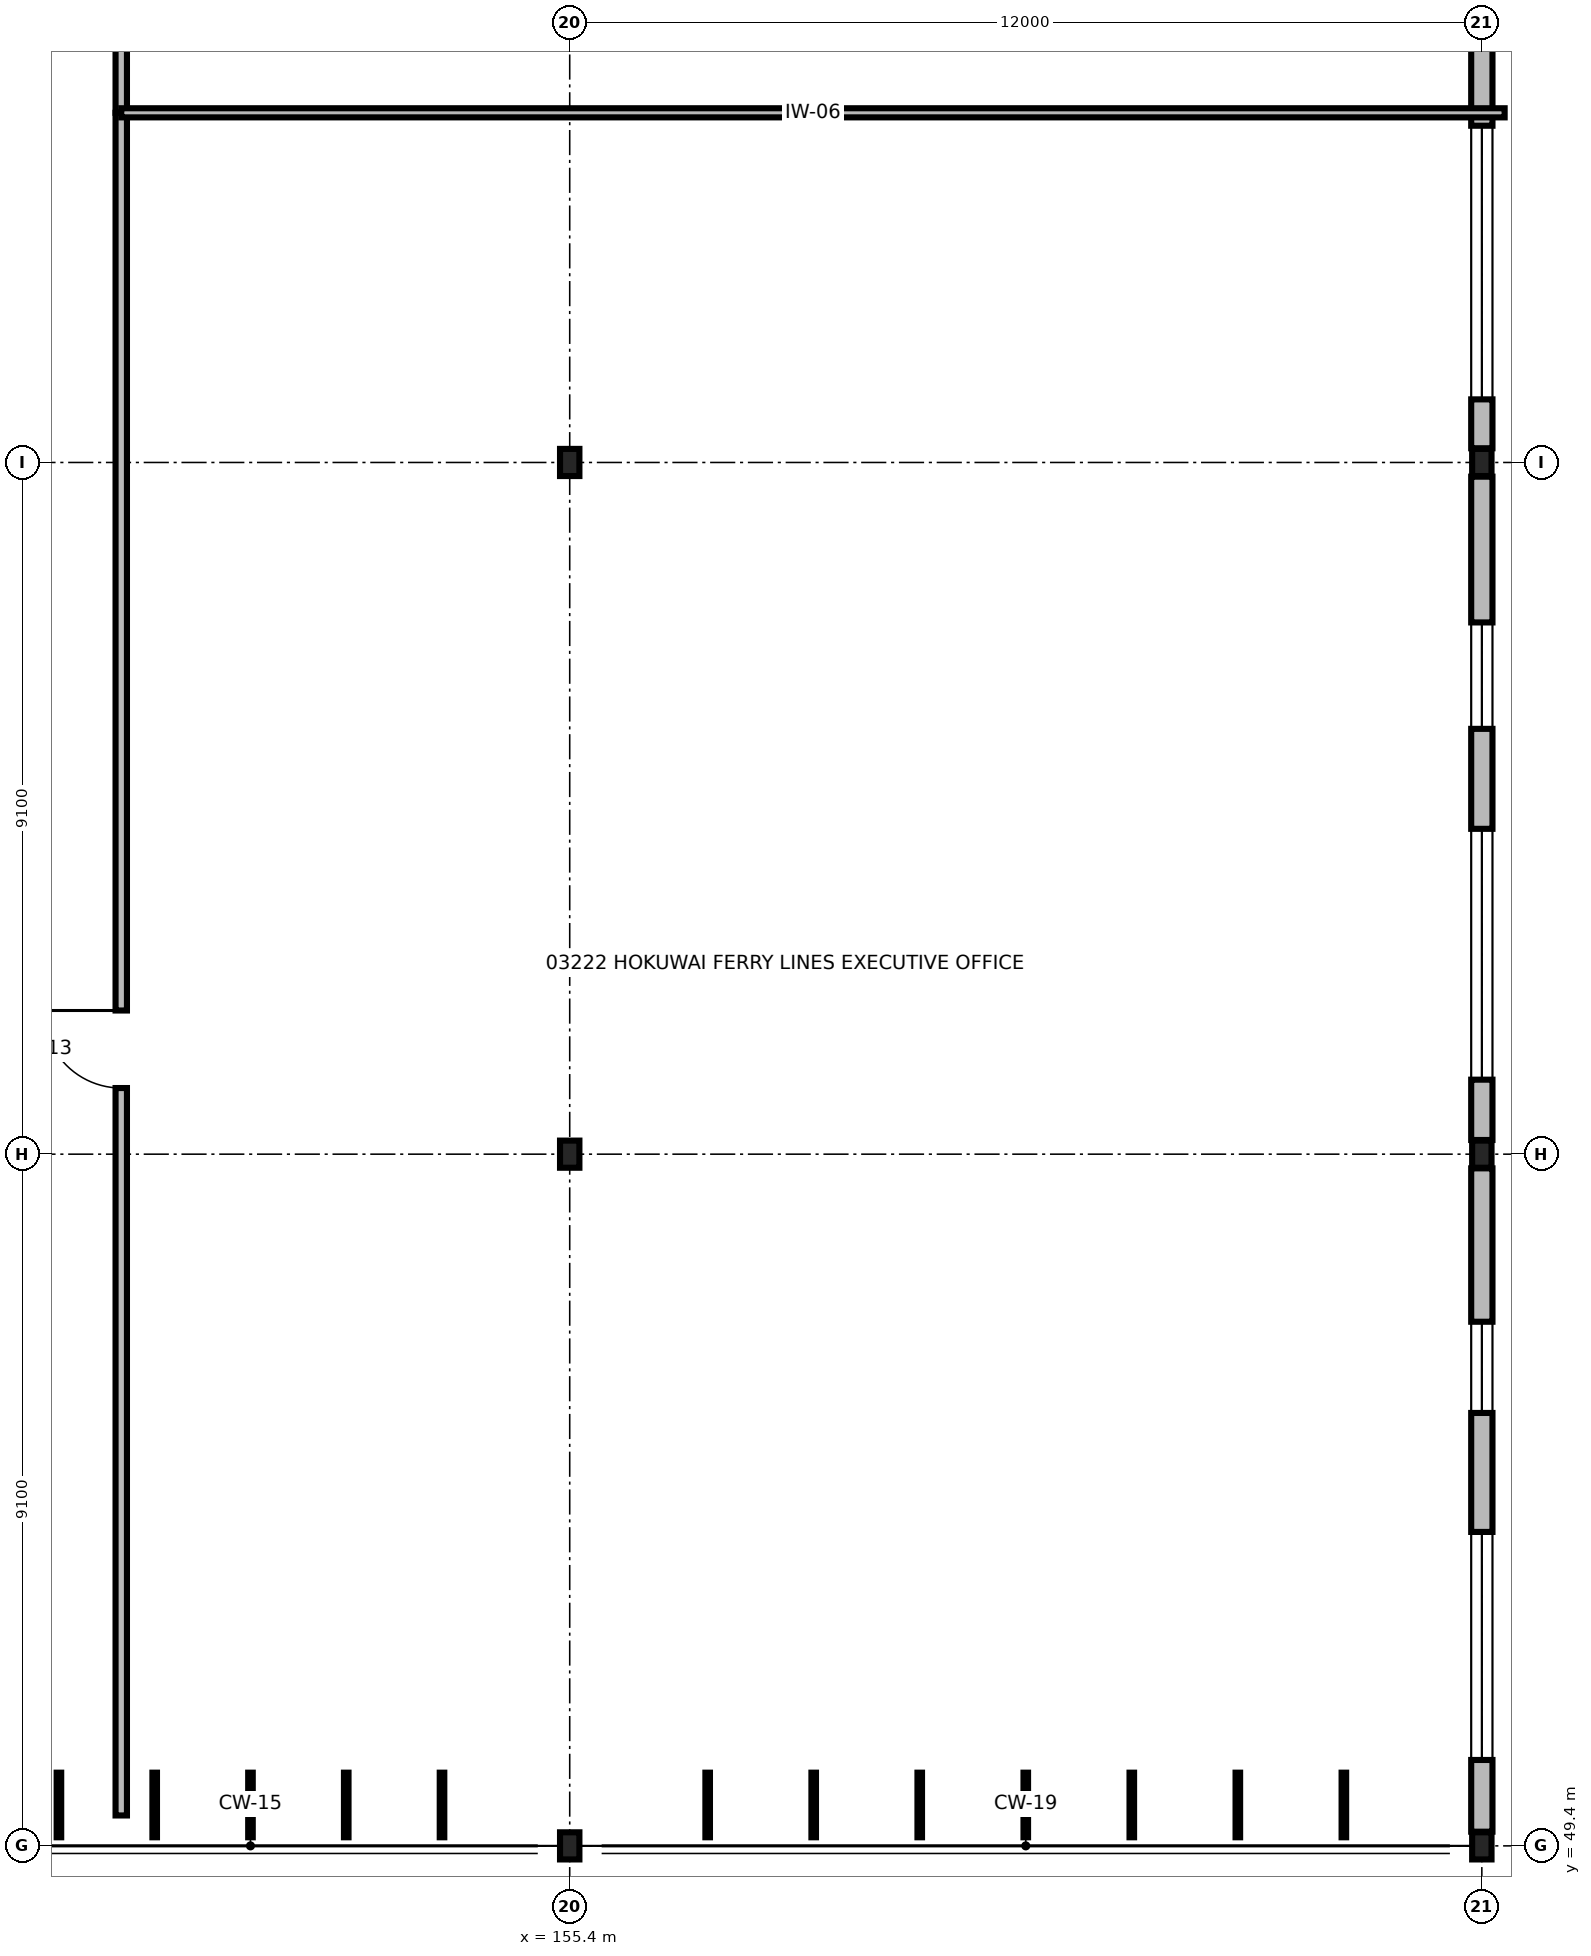
"""IFC4 building model, lengths in metres.
Left out: names, types, materials, properties, quantities, classifications, styles, units other than length and angle.
Written with IfcOpenShell. Run it as: python <this file> out.ifc"""

import sys

from ifc_helpers import new_model, si_unit, direction, frame, frame_2d, origin, origin_2d, place, context, subcontext, project, spatial, rectangle, i_section, extrude, element, fill, save


model = new_model("IFC4")
c1 = context("Model", 3, precision=1e-05, world=origin(), true_north=direction((0.0, 1.0)))
c2 = subcontext(c1, "Body", "Model", "MODEL_VIEW")
j1 = project(units=[si_unit("LENGTHUNIT", "METRE"), si_unit("PLANEANGLEUNIT", "RADIAN")], contexts=[c1])
p1 = place(None, origin())
s1 = spatial("IfcSite", under=j1, at=p1, CompositionType="ELEMENT")
p2 = place(p1, origin())
s2 = spatial("IfcBuilding", under=s1, at=p2, CompositionType="ELEMENT")
p3 = place(p2, frame((0.0, 0.0, 13.8)))
s3 = spatial("IfcBuildingStorey", under=s2, at=p3, CompositionType="ELEMENT", Elevation=13.8)
for number, where, z_axis, x_axis in (
    (1, (155.4, 49.4, 0.0), (0.0, 0.0, 1.0), (1.0, 0.0, 0.0)),
    (2, (155.4, 58.5, 0.0), (0.0, 0.0, 1.0), (1.0, 0.0, 0.0)),
    (3, (155.4, 67.6, 0.0), (0.0, 0.0, 1.0), (1.0, 0.0, 0.0)),
    (4, (167.4, 49.4, 0.0), (0.0, 0.0, 1.0), (1.0, 0.0, 0.0)),
    (5, (167.4, 58.5, 0.0), (0.0, 0.0, 1.0), (1.0, 0.0, 0.0)),
    (6, (167.4, 67.6, 0.0), (0.0, 0.0, 1.0), (1.0, 0.0, 0.0)),
):
    element("IfcColumn", number, at=place(p3, frame(where, z_axis=z_axis, x_axis=x_axis)), inside=s3, PredefinedType="COLUMN", context=c2, shape_type="SweptSolid", body=[
        extrude(i_section(OverallWidth=0.255, OverallDepth=0.357, WebThickness=0.01, FlangeThickness=0.018, at=origin_2d()), origin(), (0.0, 0.0, 1.0), 3.9),
    ])
p4 = place(p3, frame((167.4, 58.313, 0.0), z_axis=(0.0, 0.0, 1.0), x_axis=(0.0, -1.0, 0.0)))
e7 = element("IfcWall", 7, at=p4, inside=s3, PredefinedType="SOLIDWALL", context=c2, shape_type="SweptSolid", body=[
    extrude(rectangle(XDim=8.727, YDim=0.28, at=frame_2d((4.364, 0.0))), origin(), (0.0, 0.0, 1.0), 2.942),
])
p5 = place(p4, frame((2.018, 0.0, 0.95)))
e8 = element("IfcOpeningElement", 8, at=p5, cuts=e7, PredefinedType="OPENING", context=c2, shape_type="SweptSolid", body=[
    extrude(rectangle(XDim=1.2, YDim=1.75, at=frame_2d((0.6, 0.875))), frame((0.0, 0.15, 0.0), z_axis=(0.0, -1.0, 0.0), x_axis=(1.0, 0.0, 0.0)), (0.0, 0.0, 1.0), 0.3),
])
p6 = place(p4, frame((4.783, 0.0, 0.672)))
e9 = element("IfcOpeningElement", 9, at=p6, cuts=e7, PredefinedType="OPENING", context=c2, shape_type="SweptSolid", body=[
    extrude(rectangle(XDim=3.0, YDim=2.05, at=frame_2d((1.5, 1.025))), frame((0.0, 0.15, 0.0), z_axis=(0.0, -1.0, 0.0), x_axis=(1.0, 0.0, 0.0)), (0.0, 0.0, 1.0), 0.3),
])
p7 = place(p3, frame((167.4, 67.414, 0.0), z_axis=(0.0, 0.0, 1.0), x_axis=(0.0, -1.0, 0.0)))
e10 = element("IfcWall", 10, at=p7, inside=s3, PredefinedType="SOLIDWALL", context=c2, shape_type="SweptSolid", body=[
    extrude(rectangle(XDim=8.727, YDim=0.28, at=frame_2d((4.364, 0.0))), origin(), (0.0, 0.0, 1.0), 2.942),
])
p8 = place(p7, frame((1.918, 0.0, 0.95)))
e11 = element("IfcOpeningElement", 11, at=p8, cuts=e10, PredefinedType="OPENING", context=c2, shape_type="SweptSolid", body=[
    extrude(rectangle(XDim=1.4, YDim=1.75, at=frame_2d((0.7, 0.875))), frame((0.0, 0.15, 0.0), z_axis=(0.0, -1.0, 0.0), x_axis=(1.0, 0.0, 0.0)), (0.0, 0.0, 1.0), 0.3),
])
p9 = place(p7, frame((4.633, 0.0, 0.672)))
e12 = element("IfcOpeningElement", 12, at=p9, cuts=e10, PredefinedType="OPENING", context=c2, shape_type="SweptSolid", body=[
    extrude(rectangle(XDim=3.3, YDim=2.05, at=frame_2d((1.65, 1.025))), frame((0.0, 0.15, 0.0), z_axis=(0.0, -1.0, 0.0), x_axis=(1.0, 0.0, 0.0)), (0.0, 0.0, 1.0), 0.3),
])
p10 = place(p3, frame((167.4, 76.513, 0.0), z_axis=(0.0, 0.0, 1.0), x_axis=(0.0, -1.0, 0.0)))
e13 = element("IfcWall", 13, at=p10, inside=s3, PredefinedType="SOLIDWALL", context=c2, shape_type="SweptSolid", body=[
    extrude(rectangle(XDim=8.727, YDim=0.28, at=frame_2d((4.363, 0.0))), origin(), (0.0, 0.0, 1.0), 2.942),
])
p11 = place(p10, frame((1.818, 0.0, 0.95)))
e14 = element("IfcOpeningElement", 14, at=p11, cuts=e13, PredefinedType="OPENING", context=c2, shape_type="SweptSolid", body=[
    extrude(rectangle(XDim=1.6, YDim=1.75, at=frame_2d((0.8, 0.875))), frame((0.0, 0.15, 0.0), z_axis=(0.0, -1.0, 0.0), x_axis=(1.0, 0.0, 0.0)), (0.0, 0.0, 1.0), 0.3),
])
p12 = place(p10, frame((4.483, 0.0, 0.672)))
e15 = element("IfcOpeningElement", 15, at=p12, cuts=e13, PredefinedType="OPENING", context=c2, shape_type="SweptSolid", body=[
    extrude(rectangle(XDim=3.6, YDim=2.05, at=frame_2d((1.8, 1.025))), frame((0.0, 0.15, 0.0), z_axis=(0.0, -1.0, 0.0), x_axis=(1.0, 0.0, 0.0)), (0.0, 0.0, 1.0), 0.3),
])
p13 = place(p3, frame((149.5, 49.8, 0.0), z_axis=(0.0, 0.0, 1.0), x_axis=(0.0, 1.0, 0.0)))
e16 = element("IfcWall", 16, at=p13, inside=s3, PredefinedType="PARTITIONING", context=c2, shape_type="SweptSolid", body=[
    extrude(rectangle(XDim=22.4, YDim=0.15, at=frame_2d((11.2, 0.0))), origin(), (0.0, 0.0, 1.0), 3.023),
])
p14 = place(p13, frame((9.57, 0.0, 0.0)))
e17 = element("IfcOpeningElement", 17, at=p14, cuts=e16, PredefinedType="OPENING", context=c2, shape_type="SweptSolid", body=[
    extrude(rectangle(XDim=1.02, YDim=2.2, at=frame_2d((0.51, 1.1))), frame((0.0, 0.085, 0.0), z_axis=(0.0, -1.0, 0.0), x_axis=(1.0, 0.0, 0.0)), (0.0, 0.0, 1.0), 0.17),
])
p15 = place(p3, frame((149.5, 72.2, 0.0), z_axis=(0.0, 0.0, 1.0), x_axis=(0.0, 1.0, 0.0)))
e18 = element("IfcWall", 18, at=p15, inside=s3, PredefinedType="PARTITIONING", context=c2, shape_type="SweptSolid", body=[
    extrude(rectangle(XDim=22.76, YDim=0.15, at=frame_2d((11.38, 0.0))), origin(), (0.0, 0.0, 1.0), 3.023),
])
p16 = place(p15, frame((7.466, 0.0, 0.0)))
e19 = element("IfcOpeningElement", 19, at=p16, cuts=e18, PredefinedType="OPENING", context=c2, shape_type="SweptSolid", body=[
    extrude(rectangle(XDim=1.0, YDim=2.15, at=frame_2d((0.5, 1.075))), frame((0.0, 0.085, 0.0), z_axis=(0.0, -1.0, 0.0), x_axis=(1.0, 0.0, 0.0)), (0.0, 0.0, 1.0), 0.17),
])
p17 = place(p15, frame((16.545, 0.0, 0.0)))
e20 = element("IfcOpeningElement", 20, at=p17, cuts=e18, PredefinedType="OPENING", context=c2, shape_type="SweptSolid", body=[
    extrude(rectangle(XDim=1.05, YDim=2.15, at=frame_2d((0.525, 1.075))), frame((0.0, 0.085, 0.0), z_axis=(0.0, -1.0, 0.0), x_axis=(1.0, 0.0, 0.0)), (0.0, 0.0, 1.0), 0.17),
])
p18 = place(p3, frame((149.5, 72.2, 0.0), z_axis=(0.0, 0.0, 1.0), x_axis=(1.0, 0.0, 0.0)))
e21 = element("IfcWall", 21, at=p18, inside=s3, PredefinedType="PARTITIONING", context=c2, shape_type="SweptSolid", body=[
    extrude(rectangle(XDim=18.2, YDim=0.12, at=frame_2d((9.1, 0.0))), origin(), (0.0, 0.0, 1.0), 2.942),
])
p19 = place(p5, origin())
e22 = element("IfcWindow", 22, at=p19, inside=s3, PartitioningType="SINGLE_PANEL", PredefinedType="WINDOW", context=c2, shape_type="SweptSolid", body=[
    extrude(rectangle(XDim=1.2, YDim=1.75, at=frame_2d((0.6, 0.875))), frame((0.0, 0.03, 0.0), z_axis=(0.0, -1.0, 0.0), x_axis=(1.0, 0.0, 0.0)), (0.0, 0.0, 1.0), 0.06),
])
fill(e8, e22)
p20 = place(p6, origin())
e23 = element("IfcWindow", 23, at=p20, inside=s3, PartitioningType="SINGLE_PANEL", PredefinedType="WINDOW", context=c2, shape_type="SweptSolid", body=[
    extrude(rectangle(XDim=3.0, YDim=2.05, at=frame_2d((1.5, 1.025))), frame((0.0, 0.03, 0.0), z_axis=(0.0, -1.0, 0.0), x_axis=(1.0, 0.0, 0.0)), (0.0, 0.0, 1.0), 0.06),
])
fill(e9, e23)
p21 = place(p8, origin())
e24 = element("IfcWindow", 24, at=p21, inside=s3, PartitioningType="SINGLE_PANEL", PredefinedType="WINDOW", context=c2, shape_type="SweptSolid", body=[
    extrude(rectangle(XDim=1.4, YDim=1.75, at=frame_2d((0.7, 0.875))), frame((0.0, 0.03, 0.0), z_axis=(0.0, -1.0, 0.0), x_axis=(1.0, 0.0, 0.0)), (0.0, 0.0, 1.0), 0.06),
])
fill(e11, e24)
p22 = place(p9, origin())
e25 = element("IfcWindow", 25, at=p22, inside=s3, PartitioningType="SINGLE_PANEL", PredefinedType="WINDOW", context=c2, shape_type="SweptSolid", body=[
    extrude(rectangle(XDim=3.3, YDim=2.05, at=frame_2d((1.65, 1.025))), frame((0.0, 0.03, 0.0), z_axis=(0.0, -1.0, 0.0), x_axis=(1.0, 0.0, 0.0)), (0.0, 0.0, 1.0), 0.06),
])
fill(e12, e25)
p23 = place(p12, origin())
e26 = element("IfcWindow", 26, at=p23, inside=s3, PartitioningType="SINGLE_PANEL", PredefinedType="WINDOW", context=c2, shape_type="SweptSolid", body=[
    extrude(rectangle(XDim=3.6, YDim=2.05, at=frame_2d((1.8, 1.025))), frame((0.0, 0.03, 0.0), z_axis=(0.0, -1.0, 0.0), x_axis=(1.0, 0.0, 0.0)), (0.0, 0.0, 1.0), 0.06),
])
fill(e15, e26)
p24 = place(p14, frame((1.02, 0.0, 0.0), z_axis=(0.0, 0.0, 1.0), x_axis=(-1.0, 0.0, 0.0)))
e27 = element("IfcDoor", 27, at=p24, inside=s3, OperationType="SINGLE_SWING_LEFT", PredefinedType="DOOR", context=c2, shape_type="SweptSolid", body=[
    extrude(rectangle(XDim=1.02, YDim=2.2, at=frame_2d((0.51, 1.1))), frame((0.0, 0.025, 0.0), z_axis=(0.0, -1.0, 0.0), x_axis=(1.0, 0.0, 0.0)), (0.0, 0.0, 1.0), 0.05),
])
fill(e17, e27)
save(model, sys.argv[1])
